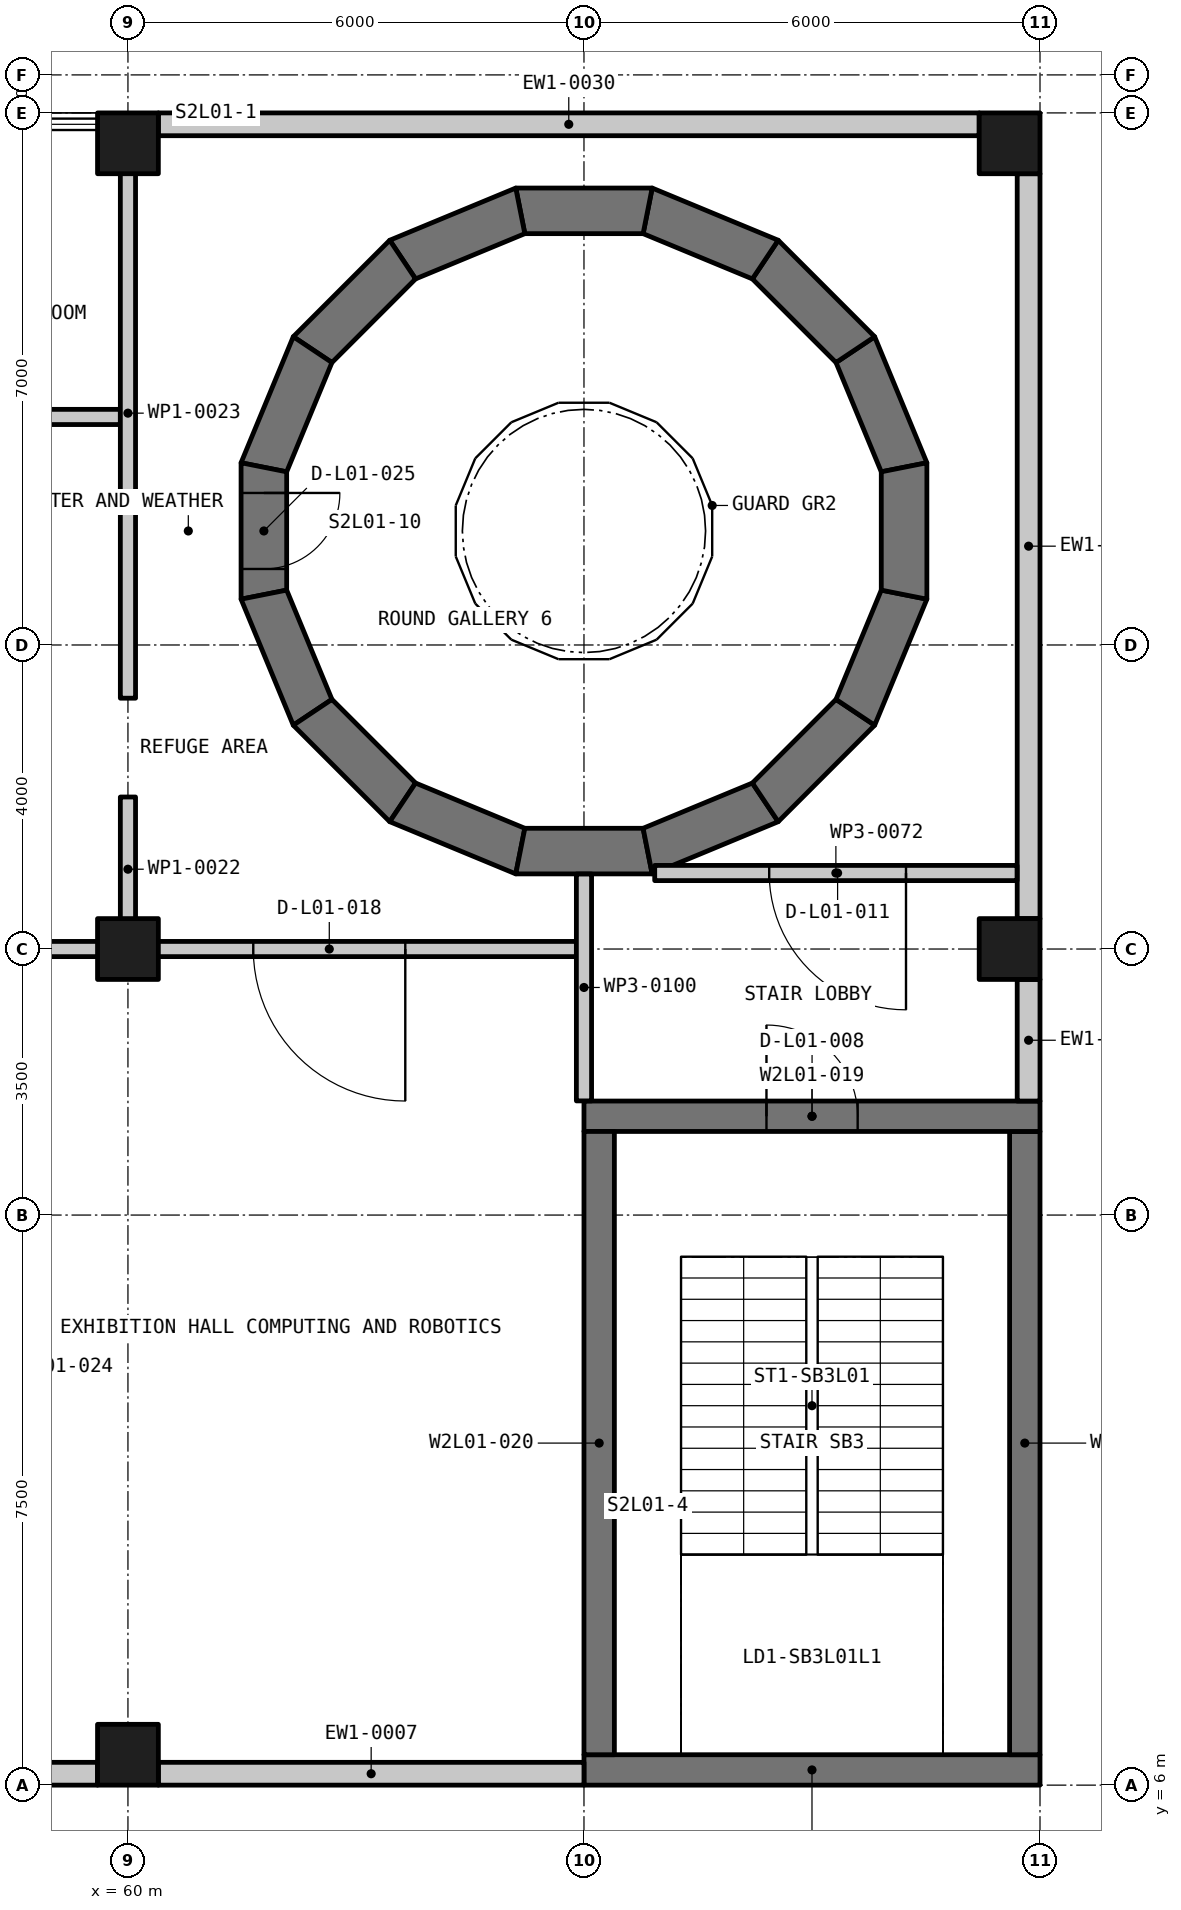
"""IFC4 building model, lengths in metres.
Left out: names, types, materials, properties, quantities, classifications, styles, units other than length and angle.
Written with IfcOpenShell. Run it as: python <this file> out.ifc"""

import sys

from ifc_helpers import new_model, si_unit, direction, frame, frame_2d, origin, origin_2d, place, context, subcontext, project, spatial, polyline, rectangle, outline, extrude, element, fill, save


model = new_model("IFC4")
c1 = context("Model", 3, precision=1e-05, world=origin(), true_north=direction((0.0, 1.0)))
c2 = subcontext(c1, "Body", "Model", "MODEL_VIEW")
j1 = project(units=[si_unit("LENGTHUNIT", "METRE"), si_unit("PLANEANGLEUNIT", "RADIAN")], contexts=[c1])
p1 = place(None, origin())
s1 = spatial("IfcSite", under=j1, at=p1, CompositionType="ELEMENT")
p2 = place(p1, origin())
s2 = spatial("IfcBuilding", under=s1, at=p2, CompositionType="ELEMENT")
p3 = place(p2, frame((0.0, 0.0, 6.0)))
s3 = spatial("IfcBuildingStorey", under=s2, at=p3, CompositionType="ELEMENT", Elevation=6.0)
for number, where, z_axis, x_axis in (
    (1, (60.0, 6.4, -0.3), (0.0, 0.0, 1.0), (1.0, 0.0, 0.0)),
    (2, (60.0, 17.0, -0.3), (0.0, 0.0, 1.0), (1.0, 0.0, 0.0)),
    (3, (60.0, 27.6, -0.3), (0.0, 0.0, 1.0), (1.0, 0.0, 0.0)),
    (4, (71.6, 17.0, -0.3), (0.0, 0.0, 1.0), (1.0, 0.0, 0.0)),
    (5, (71.6, 27.6, -0.3), (0.0, 0.0, 1.0), (1.0, 0.0, 0.0)),
):
    element("IfcColumn", number, at=place(p3, frame(where, z_axis=z_axis, x_axis=x_axis)), inside=s3, PredefinedType="COLUMN", context=c2, shape_type="SweptSolid", body=[
        extrude(rectangle(XDim=0.8, YDim=0.8, at=origin_2d()), origin(), (0.0, 0.0, 1.0), 5.25),
    ])
p4 = place(p3, frame((70.234, 23.283, -0.3), z_axis=(0.0, 0.0, 1.0), x_axis=(-0.3826441282, 0.92389581185, 0.0)))
e6 = element("IfcWall", 6, at=p4, inside=s3, PredefinedType="SHEAR", context=c2, shape_type="SweptSolid", body=[
    extrude(outline(polyline([(0.0, -0.3), (1.795, -0.3), (1.675, 0.3), (0.119, 0.3), (0.0, -0.3)])), origin(), (0.0, 0.0, 1.0), 5.25),
])
p5 = place(p3, frame((69.613, 24.844, -0.3), z_axis=(0.0, 0.0, 1.0), x_axis=(-0.707106781187, 0.707106781187, 0.0)))
e7 = element("IfcWall", 7, at=p5, inside=s3, PredefinedType="SHEAR", context=c2, shape_type="SweptSolid", body=[
    extrude(outline(polyline([(0.0, -0.3), (1.795, -0.3), (1.675, 0.3), (0.119, 0.3), (0.0, -0.3)])), origin(), (0.0, 0.0, 1.0), 5.25),
])
p6 = place(p3, frame((68.441, 26.048, -0.3), z_axis=(0.0, 0.0, 1.0), x_axis=(-0.92389581185, 0.3826441282, 0.0)))
e8 = element("IfcWall", 8, at=p6, inside=s3, PredefinedType="SHEAR", context=c2, shape_type="SweptSolid", body=[
    extrude(outline(polyline([(0.0, -0.3), (1.795, -0.3), (1.676, 0.3), (0.119, 0.3), (0.0, -0.3)])), origin(), (0.0, 0.0, 1.0), 5.25),
])
p7 = place(p3, frame((66.897, 26.712, -0.3), z_axis=(0.0, 0.0, 1.0), x_axis=(-1.0, 0.0, 0.0)))
e9 = element("IfcWall", 9, at=p7, inside=s3, PredefinedType="SHEAR", context=c2, shape_type="SweptSolid", body=[
    extrude(outline(polyline([(0.0, -0.3), (1.795, -0.3), (1.676, 0.3), (0.119, 0.3), (0.0, -0.3)])), origin(), (0.0, 0.0, 1.0), 5.25),
])
p8 = place(p3, frame((65.217, 26.734, -0.3), z_axis=(0.0, 0.0, 1.0), x_axis=(-0.92389581185, -0.3826441282, 0.0)))
e10 = element("IfcWall", 10, at=p8, inside=s3, PredefinedType="SHEAR", context=c2, shape_type="SweptSolid", body=[
    extrude(outline(polyline([(0.0, -0.3), (1.795, -0.3), (1.675, 0.3), (0.119, 0.3), (0.0, -0.3)])), origin(), (0.0, 0.0, 1.0), 5.25),
])
p9 = place(p3, frame((63.656, 26.113, -0.3), z_axis=(0.0, 0.0, 1.0), x_axis=(-0.707106781187, -0.707106781187, 0.0)))
e11 = element("IfcWall", 11, at=p9, inside=s3, PredefinedType="SHEAR", context=c2, shape_type="SweptSolid", body=[
    extrude(outline(polyline([(0.0, -0.3), (1.795, -0.3), (1.675, 0.3), (0.119, 0.3), (0.0, -0.3)])), origin(), (0.0, 0.0, 1.0), 5.25),
])
p10 = place(p3, frame((62.452, 24.941, -0.3), z_axis=(0.0, 0.0, 1.0), x_axis=(-0.3826441282, -0.92389581185, 0.0)))
e12 = element("IfcWall", 12, at=p10, inside=s3, PredefinedType="SHEAR", context=c2, shape_type="SweptSolid", body=[
    extrude(outline(polyline([(0.0, -0.3), (1.795, -0.3), (1.676, 0.3), (0.119, 0.3), (0.0, -0.3)])), origin(), (0.0, 0.0, 1.0), 5.25),
])
p11 = place(p3, frame((61.788, 23.397, -0.3), z_axis=(0.0, 0.0, 1.0), x_axis=(0.0, -1.0, 0.0)))
e13 = element("IfcWall", 13, at=p11, inside=s3, PredefinedType="SHEAR", context=c2, shape_type="SweptSolid", body=[
    extrude(outline(polyline([(0.0, -0.3), (1.795, -0.3), (1.676, 0.3), (0.119, 0.3), (0.0, -0.3)])), origin(), (0.0, 0.0, 1.0), 5.25),
])
p12 = place(p11, frame((0.397, 0.0, 0.3)))
e14 = element("IfcOpeningElement", 14, at=p12, cuts=e13, PredefinedType="OPENING", context=c2, shape_type="SweptSolid", body=[
    extrude(rectangle(XDim=1.0, YDim=2.2, at=frame_2d((0.5, 1.1))), frame((0.0, 0.31, 0.0), z_axis=(0.0, -1.0, 0.0), x_axis=(1.0, 0.0, 0.0)), (0.0, 0.0, 1.0), 0.62),
])
p13 = place(p3, frame((61.766, 21.717, -0.3), z_axis=(0.0, 0.0, 1.0), x_axis=(0.3826441282, -0.92389581185, 0.0)))
e15 = element("IfcWall", 15, at=p13, inside=s3, PredefinedType="SHEAR", context=c2, shape_type="SweptSolid", body=[
    extrude(outline(polyline([(0.0, -0.3), (1.795, -0.3), (1.675, 0.3), (0.119, 0.3), (0.0, -0.3)])), origin(), (0.0, 0.0, 1.0), 5.25),
])
p14 = place(p3, frame((62.387, 20.156, -0.3), z_axis=(0.0, 0.0, 1.0), x_axis=(0.707106781187, -0.707106781187, 0.0)))
e16 = element("IfcWall", 16, at=p14, inside=s3, PredefinedType="SHEAR", context=c2, shape_type="SweptSolid", body=[
    extrude(outline(polyline([(0.0, -0.3), (1.795, -0.3), (1.675, 0.3), (0.119, 0.3), (0.0, -0.3)])), origin(), (0.0, 0.0, 1.0), 5.25),
])
p15 = place(p3, frame((63.559, 18.952, -0.3), z_axis=(0.0, 0.0, 1.0), x_axis=(0.92389581185, -0.3826441282, 0.0)))
e17 = element("IfcWall", 17, at=p15, inside=s3, PredefinedType="SHEAR", context=c2, shape_type="SweptSolid", body=[
    extrude(outline(polyline([(0.0, -0.3), (1.795, -0.3), (1.676, 0.3), (0.119, 0.3), (0.0, -0.3)])), origin(), (0.0, 0.0, 1.0), 5.25),
])
p16 = place(p3, frame((65.103, 18.288, -0.3), z_axis=(0.0, 0.0, 1.0), x_axis=(1.0, 0.0, 0.0)))
e18 = element("IfcWall", 18, at=p16, inside=s3, PredefinedType="SHEAR", context=c2, shape_type="SweptSolid", body=[
    extrude(outline(polyline([(0.0, -0.3), (1.795, -0.3), (1.676, 0.3), (0.119, 0.3), (0.0, -0.3)])), origin(), (0.0, 0.0, 1.0), 5.25),
])
p17 = place(p3, frame((66.783, 18.266, -0.3), z_axis=(0.0, 0.0, 1.0), x_axis=(0.92389581185, 0.3826441282, 0.0)))
e19 = element("IfcWall", 19, at=p17, inside=s3, PredefinedType="SHEAR", context=c2, shape_type="SweptSolid", body=[
    extrude(outline(polyline([(0.0, -0.3), (1.795, -0.3), (1.675, 0.3), (0.119, 0.3), (0.0, -0.3)])), origin(), (0.0, 0.0, 1.0), 5.25),
])
p18 = place(p3, frame((68.344, 18.887, -0.3), z_axis=(0.0, 0.0, 1.0), x_axis=(0.707106781187, 0.707106781187, 0.0)))
e20 = element("IfcWall", 20, at=p18, inside=s3, PredefinedType="SHEAR", context=c2, shape_type="SweptSolid", body=[
    extrude(outline(polyline([(0.0, -0.3), (1.795, -0.3), (1.675, 0.3), (0.119, 0.3), (0.0, -0.3)])), origin(), (0.0, 0.0, 1.0), 5.25),
])
p19 = place(p3, frame((69.548, 20.059, -0.3), z_axis=(0.0, 0.0, 1.0), x_axis=(0.3826441282, 0.92389581185, 0.0)))
e21 = element("IfcWall", 21, at=p19, inside=s3, PredefinedType="SHEAR", context=c2, shape_type="SweptSolid", body=[
    extrude(outline(polyline([(0.0, -0.3), (1.795, -0.3), (1.676, 0.3), (0.119, 0.3), (0.0, -0.3)])), origin(), (0.0, 0.0, 1.0), 5.25),
])
p20 = place(p3, frame((70.212, 21.603, -0.3), z_axis=(0.0, 0.0, 1.0), x_axis=(0.0, 1.0, 0.0)))
e22 = element("IfcWall", 22, at=p20, inside=s3, PredefinedType="SHEAR", context=c2, shape_type="SweptSolid", body=[
    extrude(outline(polyline([(0.0, -0.3), (1.795, -0.3), (1.676, 0.3), (0.119, 0.3), (0.0, -0.3)])), origin(), (0.0, 0.0, 1.0), 5.25),
])
p21 = place(p3, frame((66.0, 6.2, -0.3), z_axis=(0.0, 0.0, 1.0), x_axis=(1.0, 0.0, 0.0)))
e23 = element("IfcWall", 23, at=p21, inside=s3, PredefinedType="SHEAR", context=c2, shape_type="SweptSolid", body=[
    extrude(rectangle(XDim=6.0, YDim=0.4, at=frame_2d((3.0, 0.0))), origin(), (0.0, 0.0, 1.0), 5.25),
])
p22 = place(p3, frame((71.8, 6.4, -0.3), z_axis=(0.0, 0.0, 1.0), x_axis=(0.0, 1.0, 0.0)))
e24 = element("IfcWall", 24, at=p22, inside=s3, PredefinedType="SHEAR", context=c2, shape_type="SweptSolid", body=[
    extrude(rectangle(XDim=8.2, YDim=0.4, at=frame_2d((4.1, 0.0))), origin(), (0.0, 0.0, 1.0), 5.25),
])
p23 = place(p3, frame((66.0, 14.8, -0.3), z_axis=(0.0, 0.0, 1.0), x_axis=(1.0, 0.0, 0.0)))
e25 = element("IfcWall", 25, at=p23, inside=s3, PredefinedType="SHEAR", context=c2, shape_type="SweptSolid", body=[
    extrude(rectangle(XDim=6.0, YDim=0.4, at=frame_2d((3.0, 0.0))), origin(), (0.0, 0.0, 1.0), 5.25),
])
p24 = place(p23, frame((2.401, 0.0, 0.3)))
e26 = element("IfcOpeningElement", 26, at=p24, cuts=e25, PredefinedType="OPENING", context=c2, shape_type="SweptSolid", body=[
    extrude(rectangle(XDim=1.2, YDim=2.2, at=frame_2d((0.6, 1.1))), frame((0.0, 0.21, 0.0), z_axis=(0.0, -1.0, 0.0), x_axis=(1.0, 0.0, 0.0)), (0.0, 0.0, 1.0), 0.42),
])
p25 = place(p3, frame((66.2, 6.4, -0.3), z_axis=(0.0, 0.0, 1.0), x_axis=(0.0, 1.0, 0.0)))
e27 = element("IfcWall", 27, at=p25, inside=s3, PredefinedType="SHEAR", context=c2, shape_type="SweptSolid", body=[
    extrude(rectangle(XDim=8.2, YDim=0.4, at=frame_2d((4.1, 0.0))), origin(), (0.0, 0.0, 1.0), 5.25),
])
p26 = place(p3, frame((66.0, 6.15, 0.0), z_axis=(0.0, 0.0, 1.0), x_axis=(-1.0, 0.0, 0.0)))
e28 = element("IfcWall", 28, at=p26, inside=s3, PredefinedType="SOLIDWALL", context=c2, shape_type="SweptSolid", body=[
    extrude(rectangle(XDim=5.6, YDim=0.3, at=frame_2d((2.8, 0.0))), origin(), (0.0, 0.0, 1.0), 4.05),
])
p27 = place(p3, frame((59.6, 6.15, 0.0), z_axis=(0.0, 0.0, 1.0), x_axis=(-1.0, 0.0, 0.0)))
e29 = element("IfcWall", 29, at=p27, inside=s3, PredefinedType="SOLIDWALL", context=c2, shape_type="SweptSolid", body=[
    extrude(rectangle(XDim=11.2, YDim=0.3, at=frame_2d((5.6, 0.0))), origin(), (0.0, 0.0, 1.0), 4.05),
])
p28 = place(p3, frame((60.4, 27.85, 0.0), z_axis=(0.0, 0.0, 1.0), x_axis=(1.0, 0.0, 0.0)))
e30 = element("IfcWall", 30, at=p28, inside=s3, PredefinedType="SOLIDWALL", context=c2, shape_type="SweptSolid", body=[
    extrude(rectangle(XDim=10.8, YDim=0.3, at=frame_2d((5.4, 0.0))), origin(), (0.0, 0.0, 1.0), 4.05),
])
p29 = place(p3, frame((71.85, 27.2, 0.0), z_axis=(0.0, 0.0, 1.0), x_axis=(0.0, -1.0, 0.0)))
e31 = element("IfcWall", 31, at=p29, inside=s3, PredefinedType="SOLIDWALL", context=c2, shape_type="SweptSolid", body=[
    extrude(rectangle(XDim=9.8, YDim=0.3, at=frame_2d((4.9, 0.0))), origin(), (0.0, 0.0, 1.0), 4.05),
])
p30 = place(p3, frame((71.85, 16.6, 0.0), z_axis=(0.0, 0.0, 1.0), x_axis=(0.0, -1.0, 0.0)))
e32 = element("IfcWall", 32, at=p30, inside=s3, PredefinedType="SOLIDWALL", context=c2, shape_type="SweptSolid", body=[
    extrude(rectangle(XDim=1.6, YDim=0.3, at=frame_2d((0.8, 0.0))), origin(), (0.0, 0.0, 1.0), 4.05),
])
p31 = place(p3, frame((65.9, 17.0, 0.0), z_axis=(0.0, 0.0, 1.0), x_axis=(-1.0, 0.0, 0.0)))
e33 = element("IfcWall", 33, at=p31, inside=s3, PredefinedType="PARTITIONING", context=c2, shape_type="SweptSolid", body=[
    extrude(rectangle(XDim=60.0, YDim=0.2, at=frame_2d((30.0, 0.0))), origin(), (0.0, 0.0, 1.0), 4.05),
])
p32 = place(p31, frame((50.75, 0.0, 0.0)))
e34 = element("IfcOpeningElement", 34, at=p32, cuts=e33, PredefinedType="OPENING", context=c2, shape_type="SweptSolid", body=[
    extrude(rectangle(XDim=1.5, YDim=2.1, at=frame_2d((0.75, 1.05))), frame((0.0, 0.11, 0.0), z_axis=(0.0, -1.0, 0.0), x_axis=(1.0, 0.0, 0.0)), (0.0, 0.0, 1.0), 0.22),
])
p33 = place(p31, frame((37.401, 0.0, 0.0)))
e35 = element("IfcOpeningElement", 35, at=p33, cuts=e33, PredefinedType="OPENING", context=c2, shape_type="SweptSolid", body=[
    extrude(rectangle(XDim=2.0, YDim=2.1, at=frame_2d((1.0, 1.05))), frame((0.0, 0.11, 0.0), z_axis=(0.0, -1.0, 0.0), x_axis=(1.0, 0.0, 0.0)), (0.0, 0.0, 1.0), 0.22),
])
p34 = place(p31, frame((11.15, 0.0, 0.0)))
e36 = element("IfcOpeningElement", 36, at=p34, cuts=e33, PredefinedType="OPENING", context=c2, shape_type="SweptSolid", body=[
    extrude(rectangle(XDim=1.5, YDim=2.1, at=frame_2d((0.75, 1.05))), frame((0.0, 0.11, 0.0), z_axis=(0.0, -1.0, 0.0), x_axis=(1.0, 0.0, 0.0)), (0.0, 0.0, 1.0), 0.22),
])
p35 = place(p31, frame((2.251, 0.0, 0.0)))
e37 = element("IfcOpeningElement", 37, at=p35, cuts=e33, PredefinedType="OPENING", context=c2, shape_type="SweptSolid", body=[
    extrude(rectangle(XDim=2.0, YDim=2.1, at=frame_2d((1.0, 1.05))), frame((0.0, 0.11, 0.0), z_axis=(0.0, -1.0, 0.0), x_axis=(1.0, 0.0, 0.0)), (0.0, 0.0, 1.0), 0.22),
])
p36 = place(p3, frame((71.698, 18.0, 0.0), z_axis=(0.0, 0.0, 1.0), x_axis=(-1.0, 0.0, 0.0)))
e38 = element("IfcWall", 38, at=p36, inside=s3, PredefinedType="PARTITIONING", context=c2, shape_type="SweptSolid", body=[
    extrude(rectangle(XDim=4.767, YDim=0.2, at=frame_2d((2.384, 0.0))), origin(), (0.0, 0.0, 1.0), 4.05),
])
p37 = place(p36, frame((1.461, 0.0, 0.0)))
e39 = element("IfcOpeningElement", 39, at=p37, cuts=e38, PredefinedType="OPENING", context=c2, shape_type="SweptSolid", body=[
    extrude(rectangle(XDim=1.8, YDim=2.1, at=frame_2d((0.9, 1.05))), frame((0.0, 0.11, 0.0), z_axis=(0.0, -1.0, 0.0), x_axis=(1.0, 0.0, 0.0)), (0.0, 0.0, 1.0), 0.22),
])
p38 = place(p3, frame((56.1, 24.0, 0.0), z_axis=(0.0, 0.0, 1.0), x_axis=(1.0, 0.0, 0.0)))
e40 = element("IfcWall", 40, at=p38, inside=s3, PredefinedType="PARTITIONING", context=c2, shape_type="SweptSolid", body=[
    extrude(rectangle(XDim=3.8, YDim=0.2, at=frame_2d((1.9, 0.0))), origin(), (0.0, 0.0, 1.0), 4.05),
])
p39 = place(p3, frame((66.0, 15.002, 0.0), z_axis=(0.0, 0.0, 1.0), x_axis=(0.0, 1.0, 0.0)))
e41 = element("IfcWall", 41, at=p39, inside=s3, PredefinedType="PARTITIONING", context=c2, shape_type="SweptSolid", body=[
    extrude(rectangle(XDim=2.984, YDim=0.2, at=frame_2d((1.492, 0.0))), origin(), (0.0, 0.0, 1.0), 4.05),
])
p40 = place(p3, frame((60.0, 17.1, 0.0), z_axis=(0.0, 0.0, 1.0), x_axis=(0.0, 1.0, 0.0)))
e42 = element("IfcWall", 42, at=p40, inside=s3, PredefinedType="PARTITIONING", context=c2, shape_type="SweptSolid", body=[
    extrude(rectangle(XDim=1.9, YDim=0.2, at=frame_2d((0.95, 0.0))), origin(), (0.0, 0.0, 1.0), 4.05),
])
p41 = place(p3, frame((60.0, 20.3, 0.0), z_axis=(0.0, 0.0, 1.0), x_axis=(0.0, 1.0, 0.0)))
e43 = element("IfcWall", 43, at=p41, inside=s3, PredefinedType="PARTITIONING", context=c2, shape_type="SweptSolid", body=[
    extrude(rectangle(XDim=7.5, YDim=0.2, at=frame_2d((3.75, 0.0))), origin(), (0.0, 0.0, 1.0), 4.05),
])
p42 = place(p24, origin())
e44 = element("IfcDoor", 44, at=p42, inside=s3, OperationType="SINGLE_SWING_RIGHT", PredefinedType="DOOR", context=c2, shape_type="SweptSolid", body=[
    extrude(rectangle(XDim=1.2, YDim=2.2, at=frame_2d((0.6, 1.1))), frame((0.0, 0.025, 0.0), z_axis=(0.0, -1.0, 0.0), x_axis=(1.0, 0.0, 0.0)), (0.0, 0.0, 1.0), 0.05),
])
fill(e26, e44)
p43 = place(p37, origin())
e45 = element("IfcDoor", 45, at=p43, inside=s3, OperationType="DOUBLE_DOOR_SINGLE_SWING", PredefinedType="DOOR", context=c2, shape_type="SweptSolid", body=[
    extrude(rectangle(XDim=1.8, YDim=2.1, at=frame_2d((0.9, 1.05))), frame((0.0, 0.025, 0.0), z_axis=(0.0, -1.0, 0.0), x_axis=(1.0, 0.0, 0.0)), (0.0, 0.0, 1.0), 0.05),
])
fill(e39, e45)
p44 = place(p35, origin())
e46 = element("IfcDoor", 46, at=p44, inside=s3, OperationType="DOUBLE_DOOR_SINGLE_SWING", PredefinedType="DOOR", context=c2, shape_type="SweptSolid", body=[
    extrude(rectangle(XDim=2.0, YDim=2.1, at=frame_2d((1.0, 1.05))), frame((0.0, 0.025, 0.0), z_axis=(0.0, -1.0, 0.0), x_axis=(1.0, 0.0, 0.0)), (0.0, 0.0, 1.0), 0.05),
])
fill(e37, e46)
p45 = place(p12, origin())
e47 = element("IfcDoor", 47, at=p45, inside=s3, OperationType="SINGLE_SWING_LEFT", PredefinedType="DOOR", context=c2, shape_type="SweptSolid", body=[
    extrude(rectangle(XDim=1.0, YDim=2.2, at=frame_2d((0.5, 1.1))), frame((0.0, 0.025, 0.0), z_axis=(0.0, -1.0, 0.0), x_axis=(1.0, 0.0, 0.0)), (0.0, 0.0, 1.0), 0.05),
])
fill(e14, e47)
save(model, sys.argv[1])
